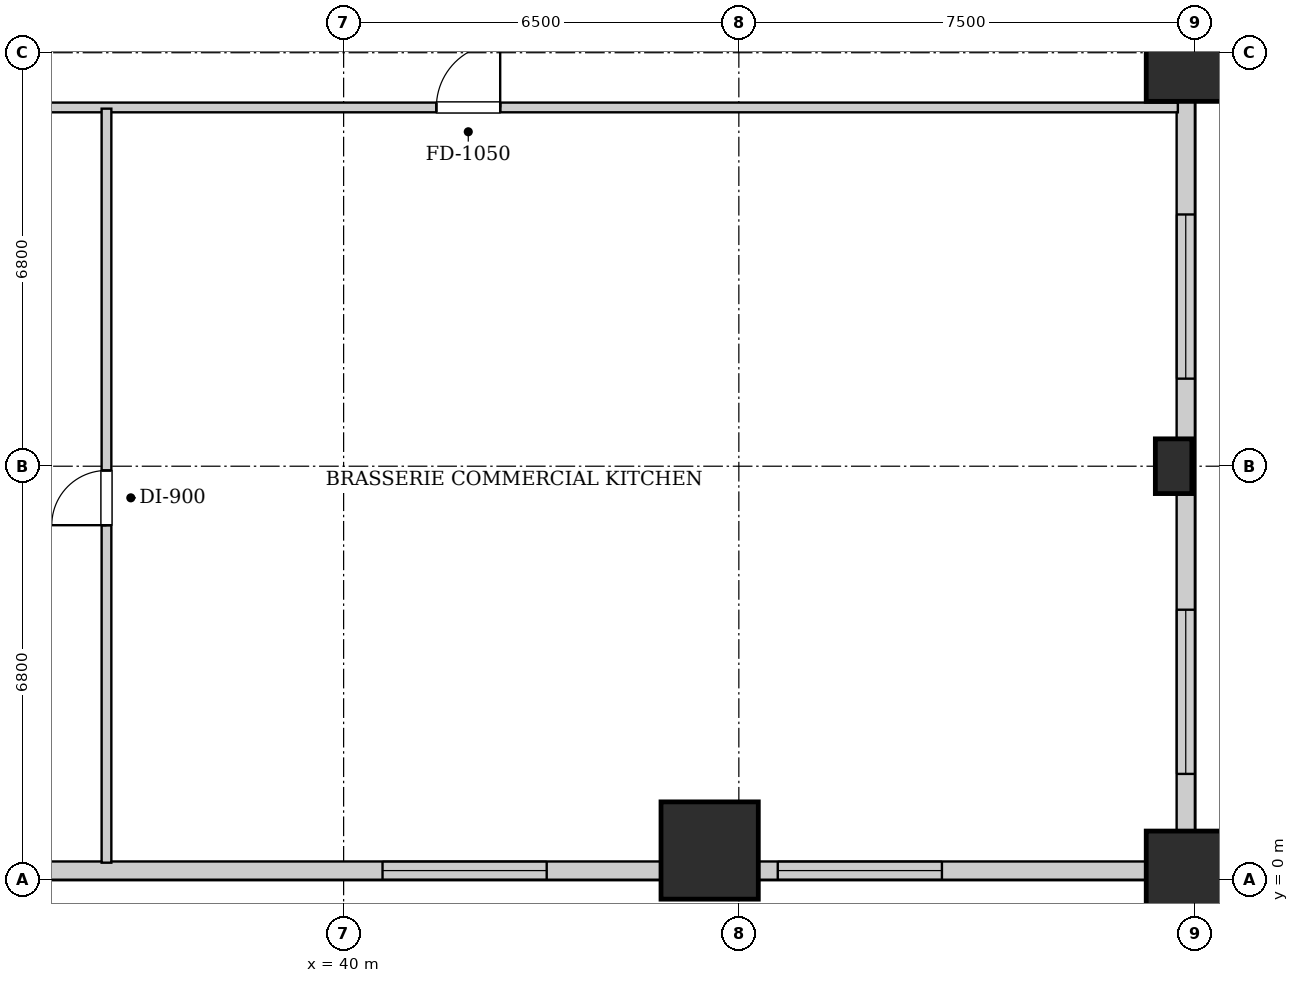
"""IFC4 building model, lengths in metres.
Left out: names, types, materials, properties, quantities, classifications, styles, units other than length and angle.
Written with IfcOpenShell. Run it as: python <this file> out.ifc"""

import sys

from ifc_helpers import new_model, si_unit, direction, frame, frame_2d, origin, origin_2d, place, context, subcontext, project, spatial, rectangle, extrude, element, fill, save


model = new_model("IFC4")
c1 = context("Model", 3, precision=1e-05, world=origin(), true_north=direction((0.0, 1.0)))
c2 = subcontext(c1, "Body", "Model", "MODEL_VIEW")
j1 = project(units=[si_unit("LENGTHUNIT", "METRE"), si_unit("PLANEANGLEUNIT", "RADIAN")], contexts=[c1])
p1 = place(None, origin())
s1 = spatial("IfcSite", under=j1, at=p1, CompositionType="ELEMENT")
p2 = place(p1, origin())
s2 = spatial("IfcBuilding", under=s1, at=p2, CompositionType="ELEMENT")
p3 = place(p2, frame((0.0, 0.0, 6.0)))
s3 = spatial("IfcBuildingStorey", under=s2, at=p3, CompositionType="ELEMENT", Elevation=6.0)
for number, where, z_axis, x_axis in (
    (1, (54.0, 0.0, 0.0), (0.0, 0.0, 1.0), (1.0, 0.0, 0.0)),
    (2, (54.0, 13.6, 0.0), (0.0, 0.0, 1.0), (1.0, 0.0, 0.0)),
    (3, (46.02, 0.48, 0.0), (0.0, 0.0, 1.0), (1.0, 0.0, 0.0)),
):
    element("IfcColumn", number, at=place(p3, frame(where, z_axis=z_axis, x_axis=x_axis)), inside=s3, PredefinedType="COLUMN", context=c2, shape_type="SweptSolid", body=[
        extrude(rectangle(XDim=1.6, YDim=1.6, at=origin_2d()), origin(), (0.0, 0.0, 1.0), 5.2),
    ])
p4 = place(p3, frame((53.65, 6.8, 0.0), z_axis=(0.0, 0.0, 1.0), x_axis=(1.0, 0.0, 0.0)))
e4 = element("IfcColumn", 4, at=p4, inside=s3, PredefinedType="PILASTER", context=c2, shape_type="SweptSolid", body=[
    extrude(rectangle(XDim=0.6, YDim=0.9, at=origin_2d()), origin(), (0.0, 0.0, 1.0), 5.2),
])
p5 = place(p3, frame((53.85, 47.44, 0.0), z_axis=(0.0, 0.0, 1.0), x_axis=(0.0, -1.0, 0.0)))
e5 = element("IfcWall", 5, at=p5, inside=s3, PredefinedType="SOLIDWALL", context=c2, shape_type="SweptSolid", body=[
    extrude(rectangle(XDim=47.28, YDim=0.3, at=frame_2d((23.64, 0.0))), origin(), (0.0, 0.0, 1.0), 3.765),
])
p6 = place(p5, frame((3.33, 0.0, 0.9)))
e6 = element("IfcOpeningElement", 6, at=p6, cuts=e5, PredefinedType="OPENING", context=c2, shape_type="SweptSolid", body=[
    extrude(rectangle(XDim=2.7, YDim=2.1, at=frame_2d((1.35, 1.05))), frame((0.0, 0.16, 0.0), z_axis=(0.0, -1.0, 0.0), x_axis=(1.0, 0.0, 0.0)), (0.0, 0.0, 1.0), 0.32),
])
p7 = place(p5, frame((9.78, 0.0, 0.9)))
e7 = element("IfcOpeningElement", 7, at=p7, cuts=e5, PredefinedType="OPENING", context=c2, shape_type="SweptSolid", body=[
    extrude(rectangle(XDim=2.7, YDim=2.1, at=frame_2d((1.35, 1.05))), frame((0.0, 0.16, 0.0), z_axis=(0.0, -1.0, 0.0), x_axis=(1.0, 0.0, 0.0)), (0.0, 0.0, 1.0), 0.32),
])
p8 = place(p5, frame((21.2, 0.0, 0.55)))
e8 = element("IfcOpeningElement", 8, at=p8, cuts=e5, PredefinedType="OPENING", context=c2, shape_type="SweptSolid", body=[
    extrude(rectangle(XDim=1.35, YDim=1.2, at=frame_2d((0.675, 0.6))), frame((0.0, 0.16, 0.0), z_axis=(0.0, -1.0, 0.0), x_axis=(1.0, 0.0, 0.0)), (0.0, 0.0, 1.0), 0.32),
])
p9 = place(p5, frame((36.5, 0.0, 0.9)))
e9 = element("IfcOpeningElement", 9, at=p9, cuts=e5, PredefinedType="OPENING", context=c2, shape_type="SweptSolid", body=[
    extrude(rectangle(XDim=2.7, YDim=2.1, at=frame_2d((1.35, 1.05))), frame((0.0, 0.16, 0.0), z_axis=(0.0, -1.0, 0.0), x_axis=(1.0, 0.0, 0.0)), (0.0, 0.0, 1.0), 0.32),
])
p10 = place(p5, frame((43.0, 0.0, 0.9)))
e10 = element("IfcOpeningElement", 10, at=p10, cuts=e5, PredefinedType="OPENING", context=c2, shape_type="SweptSolid", body=[
    extrude(rectangle(XDim=2.7, YDim=2.1, at=frame_2d((1.35, 1.05))), frame((0.0, 0.16, 0.0), z_axis=(0.0, -1.0, 0.0), x_axis=(1.0, 0.0, 0.0)), (0.0, 0.0, 1.0), 0.32),
])
p11 = place(p3, frame((53.84, 0.15, 0.0), z_axis=(0.0, 0.0, 1.0), x_axis=(-1.0, 0.0, 0.0)))
e11 = element("IfcWall", 11, at=p11, inside=s3, PredefinedType="SOLIDWALL", context=c2, shape_type="SweptSolid", body=[
    extrude(rectangle(XDim=53.68, YDim=0.3, at=frame_2d((26.84, 0.0))), origin(), (0.0, 0.0, 1.0), 3.765),
])
p12 = place(p11, frame((4.0, 0.0, 0.9)))
e12 = element("IfcOpeningElement", 12, at=p12, cuts=e11, PredefinedType="OPENING", context=c2, shape_type="SweptSolid", body=[
    extrude(rectangle(XDim=2.7, YDim=2.1, at=frame_2d((1.35, 1.05))), frame((0.0, 0.16, 0.0), z_axis=(0.0, -1.0, 0.0), x_axis=(1.0, 0.0, 0.0)), (0.0, 0.0, 1.0), 0.32),
])
p13 = place(p11, frame((10.5, 0.0, 0.9)))
e13 = element("IfcOpeningElement", 13, at=p13, cuts=e11, PredefinedType="OPENING", context=c2, shape_type="SweptSolid", body=[
    extrude(rectangle(XDim=2.7, YDim=2.1, at=frame_2d((1.35, 1.05))), frame((0.0, 0.16, 0.0), z_axis=(0.0, -1.0, 0.0), x_axis=(1.0, 0.0, 0.0)), (0.0, 0.0, 1.0), 0.32),
])
p14 = place(p11, frame((21.6, 0.0, 0.9)))
e14 = element("IfcOpeningElement", 14, at=p14, cuts=e11, PredefinedType="OPENING", context=c2, shape_type="SweptSolid", body=[
    extrude(rectangle(XDim=2.7, YDim=2.1, at=frame_2d((1.35, 1.05))), frame((0.0, 0.16, 0.0), z_axis=(0.0, -1.0, 0.0), x_axis=(1.0, 0.0, 0.0)), (0.0, 0.0, 1.0), 0.32),
])
p15 = place(p11, frame((37.0, 0.0, 0.9)))
e15 = element("IfcOpeningElement", 15, at=p15, cuts=e11, PredefinedType="OPENING", context=c2, shape_type="SweptSolid", body=[
    extrude(rectangle(XDim=2.7, YDim=2.1, at=frame_2d((1.35, 1.05))), frame((0.0, 0.16, 0.0), z_axis=(0.0, -1.0, 0.0), x_axis=(1.0, 0.0, 0.0)), (0.0, 0.0, 1.0), 0.32),
])
p16 = place(p11, frame((42.2, 0.0, 0.9)))
e16 = element("IfcOpeningElement", 16, at=p16, cuts=e11, PredefinedType="OPENING", context=c2, shape_type="SweptSolid", body=[
    extrude(rectangle(XDim=2.7, YDim=2.1, at=frame_2d((1.35, 1.05))), frame((0.0, 0.16, 0.0), z_axis=(0.0, -1.0, 0.0), x_axis=(1.0, 0.0, 0.0)), (0.0, 0.0, 1.0), 0.32),
])
p17 = place(p3, frame((5.8, 12.7, 0.0), z_axis=(0.0, 0.0, 1.0), x_axis=(1.0, 0.0, 0.0)))
e17 = element("IfcWall", 17, at=p17, inside=s3, PredefinedType="PARTITIONING", context=c2, shape_type="SweptSolid", body=[
    extrude(rectangle(XDim=47.92, YDim=0.16, at=frame_2d((23.96, 0.0))), origin(), (0.0, 0.0, 1.0), 4.88),
])
p18 = place(p17, frame((3.8, 0.0, 0.0)))
e18 = element("IfcOpeningElement", 18, at=p18, cuts=e17, PredefinedType="OPENING", context=c2, shape_type="SweptSolid", body=[
    extrude(rectangle(XDim=0.9, YDim=2.05, at=frame_2d((0.45, 1.025))), frame((0.0, 0.09, 0.0), z_axis=(0.0, -1.0, 0.0), x_axis=(1.0, 0.0, 0.0)), (0.0, 0.0, 1.0), 0.18),
])
p19 = place(p17, frame((9.32, 0.0, 0.0)))
e19 = element("IfcOpeningElement", 19, at=p19, cuts=e17, PredefinedType="OPENING", context=c2, shape_type="SweptSolid", body=[
    extrude(rectangle(XDim=0.86, YDim=2.05, at=frame_2d((0.43, 1.025))), frame((0.0, 0.09, 0.0), z_axis=(0.0, -1.0, 0.0), x_axis=(1.0, 0.0, 0.0)), (0.0, 0.0, 1.0), 0.18),
])
p20 = place(p17, frame((18.975, 0.0, 0.0)))
e20 = element("IfcOpeningElement", 20, at=p20, cuts=e17, PredefinedType="OPENING", context=c2, shape_type="SweptSolid", body=[
    extrude(rectangle(XDim=1.05, YDim=2.05, at=frame_2d((0.525, 1.025))), frame((0.0, 0.09, 0.0), z_axis=(0.0, -1.0, 0.0), x_axis=(1.0, 0.0, 0.0)), (0.0, 0.0, 1.0), 0.18),
])
p21 = place(p17, frame((35.725, 0.0, 0.0)))
e21 = element("IfcOpeningElement", 21, at=p21, cuts=e17, PredefinedType="OPENING", context=c2, shape_type="SweptSolid", body=[
    extrude(rectangle(XDim=1.05, YDim=2.05, at=frame_2d((0.525, 1.025))), frame((0.0, 0.09, 0.0), z_axis=(0.0, -1.0, 0.0), x_axis=(1.0, 0.0, 0.0)), (0.0, 0.0, 1.0), 0.18),
])
p22 = place(p3, frame((36.1, 0.28, 0.0), z_axis=(0.0, 0.0, 1.0), x_axis=(0.0, 1.0, 0.0)))
e22 = element("IfcWall", 22, at=p22, inside=s3, PredefinedType="PARTITIONING", context=c2, shape_type="SweptSolid", body=[
    extrude(rectangle(XDim=12.4, YDim=0.16, at=frame_2d((6.2, 0.0))), origin(), (0.0, 0.0, 1.0), 4.88),
])
p23 = place(p22, frame((5.55, 0.0, 0.0)))
e23 = element("IfcOpeningElement", 23, at=p23, cuts=e22, PredefinedType="OPENING", context=c2, shape_type="SweptSolid", body=[
    extrude(rectangle(XDim=0.9, YDim=2.05, at=frame_2d((0.45, 1.025))), frame((0.0, 0.09, 0.0), z_axis=(0.0, -1.0, 0.0), x_axis=(1.0, 0.0, 0.0)), (0.0, 0.0, 1.0), 0.18),
])
p24 = place(p21, origin())
e24 = element("IfcDoor", 24, at=p24, inside=s3, OperationType="SINGLE_SWING_RIGHT", PredefinedType="DOOR", context=c2, shape_type="SweptSolid", body=[
    extrude(rectangle(XDim=1.05, YDim=2.05, at=frame_2d((0.525, 1.025))), frame((0.0, 0.025, 0.0), z_axis=(0.0, -1.0, 0.0), x_axis=(1.0, 0.0, 0.0)), (0.0, 0.0, 1.0), 0.05),
])
fill(e21, e24)
p25 = place(p23, origin())
e25 = element("IfcDoor", 25, at=p25, inside=s3, OperationType="SINGLE_SWING_LEFT", PredefinedType="DOOR", context=c2, shape_type="SweptSolid", body=[
    extrude(rectangle(XDim=0.9, YDim=2.05, at=frame_2d((0.45, 1.025))), frame((0.0, 0.025, 0.0), z_axis=(0.0, -1.0, 0.0), x_axis=(1.0, 0.0, 0.0)), (0.0, 0.0, 1.0), 0.05),
])
fill(e23, e25)
p26 = place(p9, origin())
e26 = element("IfcWindow", 26, at=p26, inside=s3, PartitioningType="TRIPLE_PANEL_VERTICAL", PredefinedType="WINDOW", context=c2, shape_type="SweptSolid", body=[
    extrude(rectangle(XDim=2.7, YDim=2.1, at=frame_2d((1.35, 1.05))), frame((0.0, 0.03, 0.0), z_axis=(0.0, -1.0, 0.0), x_axis=(1.0, 0.0, 0.0)), (0.0, 0.0, 1.0), 0.06),
])
fill(e9, e26)
p27 = place(p10, origin())
e27 = element("IfcWindow", 27, at=p27, inside=s3, PartitioningType="TRIPLE_PANEL_VERTICAL", PredefinedType="WINDOW", context=c2, shape_type="SweptSolid", body=[
    extrude(rectangle(XDim=2.7, YDim=2.1, at=frame_2d((1.35, 1.05))), frame((0.0, 0.03, 0.0), z_axis=(0.0, -1.0, 0.0), x_axis=(1.0, 0.0, 0.0)), (0.0, 0.0, 1.0), 0.06),
])
fill(e10, e27)
p28 = place(p12, origin())
e28 = element("IfcWindow", 28, at=p28, inside=s3, PartitioningType="TRIPLE_PANEL_VERTICAL", PredefinedType="WINDOW", context=c2, shape_type="SweptSolid", body=[
    extrude(rectangle(XDim=2.7, YDim=2.1, at=frame_2d((1.35, 1.05))), frame((0.0, 0.03, 0.0), z_axis=(0.0, -1.0, 0.0), x_axis=(1.0, 0.0, 0.0)), (0.0, 0.0, 1.0), 0.06),
])
fill(e12, e28)
p29 = place(p13, origin())
e29 = element("IfcWindow", 29, at=p29, inside=s3, PartitioningType="TRIPLE_PANEL_VERTICAL", PredefinedType="WINDOW", context=c2, shape_type="SweptSolid", body=[
    extrude(rectangle(XDim=2.7, YDim=2.1, at=frame_2d((1.35, 1.05))), frame((0.0, 0.03, 0.0), z_axis=(0.0, -1.0, 0.0), x_axis=(1.0, 0.0, 0.0)), (0.0, 0.0, 1.0), 0.06),
])
fill(e13, e29)
save(model, sys.argv[1])
